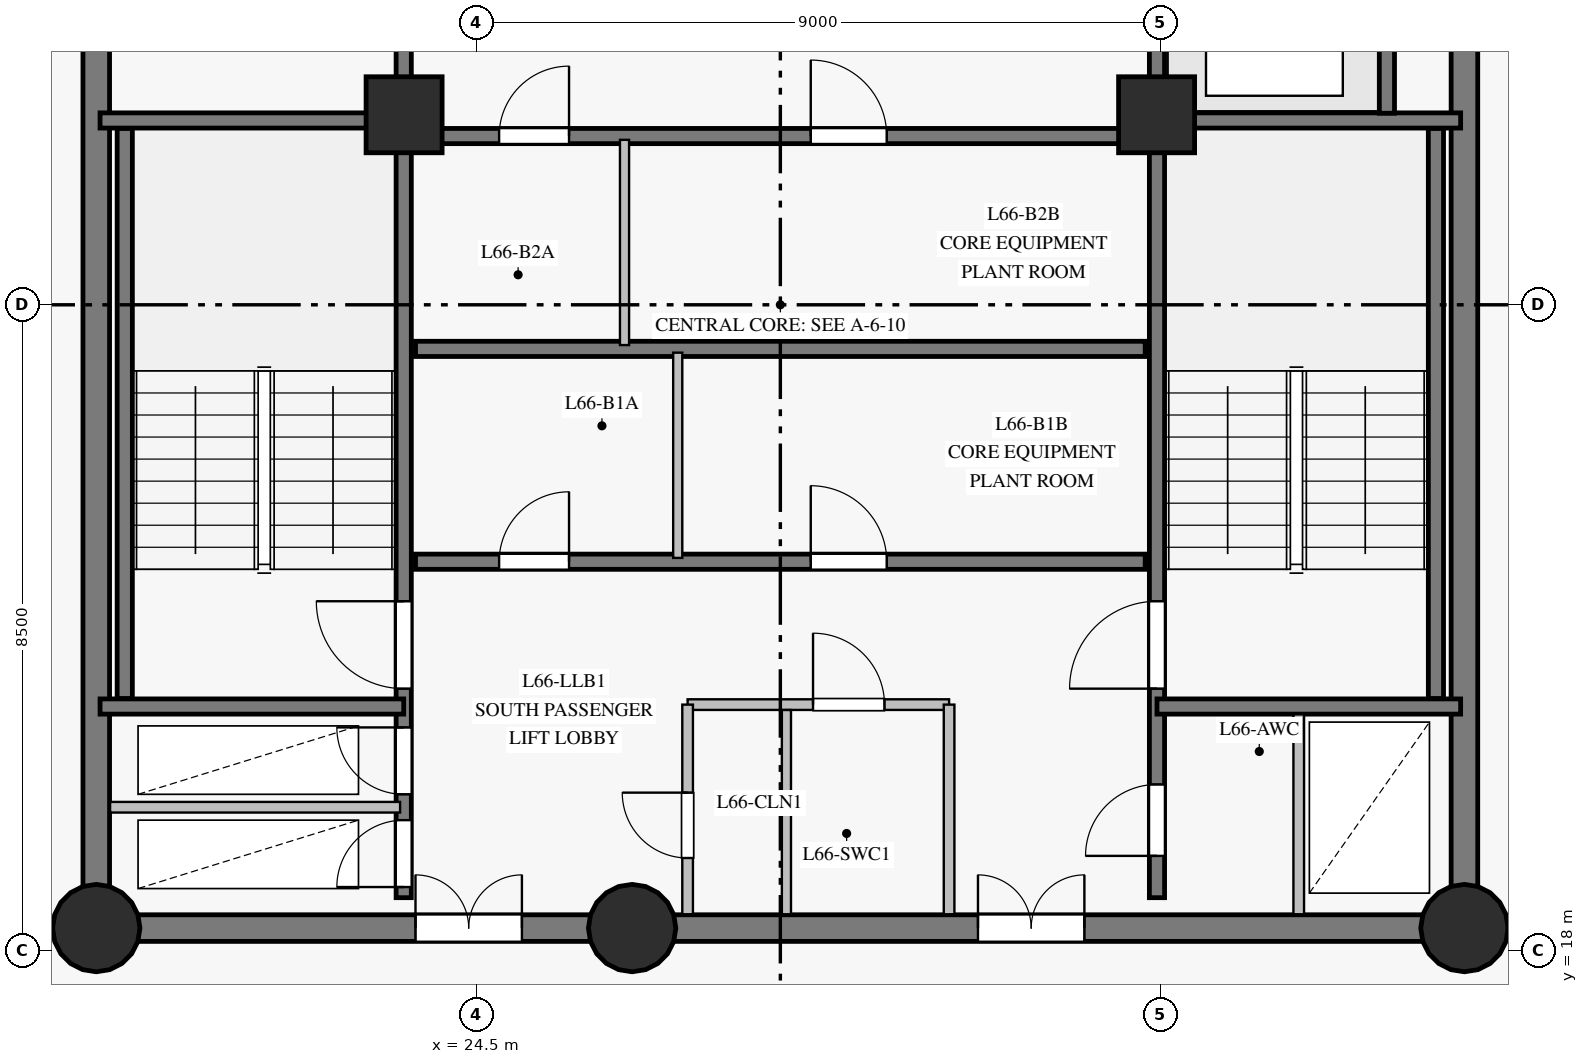
"""IFC4 building model, lengths in metres.
Left out: names, types, materials, properties, quantities, classifications, styles, units other than length and angle.
Written with IfcOpenShell. Run it as: python <this file> out.ifc"""

import sys

from ifc_helpers import new_model, si_unit, direction, frame, frame_2d, origin, origin_with_axes, origin_2d, place, context, subcontext, project, spatial, rectangle, circle, extrude, source, transform, mapped, element, fill, save


model = new_model("IFC4")
c1 = context("Model", 3, precision=1e-05, world=origin(), true_north=direction((0.0, 1.0)))
c2 = subcontext(c1, "Body", "Model", "MODEL_VIEW")
j1 = project(units=[si_unit("LENGTHUNIT", "METRE"), si_unit("PLANEANGLEUNIT", "RADIAN")], contexts=[c1])
p1 = place(None, origin())
s1 = spatial("IfcSite", under=j1, at=p1, CompositionType="ELEMENT")
p2 = place(p1, origin())
s2 = spatial("IfcBuilding", under=s1, at=p2, CompositionType="ELEMENT")
p3 = place(p2, frame((0.0, 0.0, 226.05)))
s3 = spatial("IfcBuildingStorey", under=s2, at=p3, CompositionType="ELEMENT", Elevation=226.05)
p4 = place(p3, frame((19.5, 18.3, 0.0), z_axis=(0.0, 0.0, 1.0), x_axis=(1.0, 0.0, 0.0)))
e1 = element("IfcWall", 1, at=p4, inside=s3, PredefinedType="SHEAR", context=c2, shape_type="SweptSolid", body=[
    extrude(rectangle(XDim=7.05, YDim=0.35, at=frame_2d((3.525, 0.0))), origin(), (0.0, 0.0, 1.0), 2.85),
])
p5 = place(p4, frame((4.2, 0.0, 0.0)))
e2 = element("IfcOpeningElement", 2, at=p5, cuts=e1, PredefinedType="OPENING", context=c2, shape_type="SweptSolid", body=[
    extrude(rectangle(XDim=1.4, YDim=2.2, at=frame_2d((0.7, 1.1))), frame((0.0, 0.185, 0.0), z_axis=(0.0, -1.0, 0.0), x_axis=(1.0, 0.0, 0.0)), (0.0, 0.0, 1.0), 0.37),
])
p6 = place(p3, frame((26.55, 18.3, 0.0), z_axis=(0.0, 0.0, 1.0), x_axis=(1.0, 0.0, 0.0)))
e3 = element("IfcWall", 3, at=p6, inside=s3, PredefinedType="SHEAR", context=c2, shape_type="SweptSolid", body=[
    extrude(rectangle(XDim=10.95, YDim=0.35, at=frame_2d((5.475, 0.0))), origin(), (0.0, 0.0, 1.0), 2.85),
])
p7 = place(p6, frame((4.55, 0.0, 0.0)))
e4 = element("IfcOpeningElement", 4, at=p7, cuts=e3, PredefinedType="OPENING", context=c2, shape_type="SweptSolid", body=[
    extrude(rectangle(XDim=1.4, YDim=2.2, at=frame_2d((0.7, 1.1))), frame((0.0, 0.185, 0.0), z_axis=(0.0, -1.0, 0.0), x_axis=(1.0, 0.0, 0.0)), (0.0, 0.0, 1.0), 0.37),
])
p8 = place(p3, frame((37.5, 18.3, 0.0), z_axis=(0.0, 0.0, 1.0), x_axis=(0.0, 1.0, 0.0)))
e5 = element("IfcWall", 5, at=p8, inside=s3, PredefinedType="SHEAR", context=c2, shape_type="SweptSolid", body=[
    extrude(rectangle(XDim=16.4, YDim=0.35, at=frame_2d((8.2, 0.0))), origin(), (0.0, 0.0, 1.0), 2.85),
])
p9 = place(p8, frame((13.85, 0.0, 0.0)))
e6 = element("IfcOpeningElement", 6, at=p9, cuts=e5, PredefinedType="OPENING", context=c2, shape_type="SweptSolid", body=[
    extrude(rectangle(XDim=1.2, YDim=2.15, at=frame_2d((0.6, 1.075))), frame((0.0, 0.185, 0.0), z_axis=(0.0, -1.0, 0.0), x_axis=(1.0, 0.0, 0.0)), (0.0, 0.0, 1.0), 0.37),
])
p10 = place(p3, frame((19.5, 34.7, 0.0), z_axis=(0.0, 0.0, 1.0), x_axis=(0.0, -1.0, 0.0)))
e7 = element("IfcWall", 7, at=p10, inside=s3, PredefinedType="SHEAR", context=c2, shape_type="SweptSolid", body=[
    extrude(rectangle(XDim=16.4, YDim=0.35, at=frame_2d((8.2, 0.0))), origin(), (0.0, 0.0, 1.0), 2.85),
])
p11 = place(p10, frame((3.24, 0.0, 0.0)))
e8 = element("IfcOpeningElement", 8, at=p11, cuts=e7, PredefinedType="OPENING", context=c2, shape_type="SweptSolid", body=[
    extrude(rectangle(XDim=1.1, YDim=2.15, at=frame_2d((0.55, 1.075))), frame((0.0, 0.185, 0.0), z_axis=(0.0, -1.0, 0.0), x_axis=(1.0, 0.0, 0.0)), (0.0, 0.0, 1.0), 0.37),
])
m1 = source(origin_with_axes(), c2, "Body", "SweptSolid", [
    extrude(circle(Radius=0.575, at=origin_2d()), origin(), (0.0, 0.0, 1.0), 3.05),
])
for number, where, z_axis, x_axis in (
    (9, (19.5, 18.3, 0.0), (0.0, 0.0, 1.0), (1.0, 0.0, 0.0)),
    (10, (26.55, 18.3, 0.0), (0.0, 0.0, 1.0), (1.0, 0.0, 0.0)),
    (11, (37.5, 18.3, 0.0), (0.0, 0.0, 1.0), (1.0, 0.0, 0.0)),
):
    element("IfcColumn", number, at=place(p3, frame(where, z_axis=z_axis, x_axis=x_axis)), inside=s3, PredefinedType="COLUMN", context=c2, shape_type="MappedRepresentation", body=[
        mapped(m1, transform((0.0, 0.0, 0.0), scale=1.0)),
    ])
m2 = source(origin_with_axes(), c2, "Body", "SweptSolid", [
    extrude(rectangle(XDim=1.0, YDim=1.0, at=origin_2d()), origin(), (0.0, 0.0, 1.0), 3.05),
])
for number, where, z_axis, x_axis in (
    (12, (23.55, 29.0, 0.0), (0.0, 0.0, 1.0), (1.0, 0.0, 0.0)),
    (13, (33.45, 29.0, 0.0), (0.0, 0.0, 1.0), (1.0, 0.0, 0.0)),
):
    element("IfcColumn", number, at=place(p3, frame(where, z_axis=z_axis, x_axis=x_axis)), inside=s3, PredefinedType="COLUMN", context=c2, shape_type="MappedRepresentation", body=[
        mapped(m2, transform((0.0, 0.0, 0.0), scale=1.0)),
    ])
p12 = place(p3, frame((23.545, 18.7, 0.0), z_axis=(0.0, 0.0, 1.0), x_axis=(0.0, 1.0, 0.0)))
e14 = element("IfcWall", 14, at=p12, inside=s3, PredefinedType="SHEAR", context=c2, shape_type="SweptSolid", body=[
    extrude(rectangle(XDim=15.6, YDim=0.2, at=frame_2d((7.8, 0.0))), origin(), (0.0, 0.0, 1.0), 2.85),
])
p13 = place(p12, frame((2.75, 0.0, 0.0)))
e15 = element("IfcOpeningElement", 15, at=p13, cuts=e14, PredefinedType="OPENING", context=c2, shape_type="SweptSolid", body=[
    extrude(rectangle(XDim=1.15, YDim=2.15, at=frame_2d((0.575, 1.075))), frame((0.0, 0.11, 0.0), z_axis=(0.0, -1.0, 0.0), x_axis=(1.0, 0.0, 0.0)), (0.0, 0.0, 1.0), 0.22),
])
p14 = place(p12, frame((0.14, 0.0, 0.0)))
e16 = element("IfcOpeningElement", 16, at=p14, cuts=e14, PredefinedType="OPENING", context=c2, shape_type="SweptSolid", body=[
    extrude(rectangle(XDim=0.88, YDim=2.1, at=frame_2d((0.44, 1.05))), frame((0.0, 0.11, 0.0), z_axis=(0.0, -1.0, 0.0), x_axis=(1.0, 0.0, 0.0)), (0.0, 0.0, 1.0), 0.22),
])
p15 = place(p12, frame((1.36, 0.0, 0.0)))
e17 = element("IfcOpeningElement", 17, at=p15, cuts=e14, PredefinedType="OPENING", context=c2, shape_type="SweptSolid", body=[
    extrude(rectangle(XDim=0.88, YDim=2.1, at=frame_2d((0.44, 1.05))), frame((0.0, 0.11, 0.0), z_axis=(0.0, -1.0, 0.0), x_axis=(1.0, 0.0, 0.0)), (0.0, 0.0, 1.0), 0.22),
])
p16 = place(p12, frame((12.1, 0.0, 0.0)))
e18 = element("IfcOpeningElement", 18, at=p16, cuts=e14, PredefinedType="OPENING", context=c2, shape_type="SweptSolid", body=[
    extrude(rectangle(XDim=1.12, YDim=2.15, at=frame_2d((0.56, 1.075))), frame((0.0, 0.11, 0.0), z_axis=(0.0, -1.0, 0.0), x_axis=(1.0, 0.0, 0.0)), (0.0, 0.0, 1.0), 0.22),
])
p17 = place(p12, frame((14.05, 0.0, 0.0)))
e19 = element("IfcOpeningElement", 19, at=p17, cuts=e14, PredefinedType="OPENING", context=c2, shape_type="SweptSolid", body=[
    extrude(rectangle(XDim=1.12, YDim=2.15, at=frame_2d((0.56, 1.075))), frame((0.0, 0.11, 0.0), z_axis=(0.0, -1.0, 0.0), x_axis=(1.0, 0.0, 0.0)), (0.0, 0.0, 1.0), 0.22),
])
p18 = place(p3, frame((33.455, 18.7, 0.0), z_axis=(0.0, 0.0, 1.0), x_axis=(0.0, 1.0, 0.0)))
e20 = element("IfcWall", 20, at=p18, inside=s3, PredefinedType="SHEAR", context=c2, shape_type="SweptSolid", body=[
    extrude(rectangle(XDim=15.6, YDim=0.2, at=frame_2d((7.8, 0.0))), origin(), (0.0, 0.0, 1.0), 2.85),
])
p19 = place(p18, frame((2.75, 0.0, 0.0)))
e21 = element("IfcOpeningElement", 21, at=p19, cuts=e20, PredefinedType="OPENING", context=c2, shape_type="SweptSolid", body=[
    extrude(rectangle(XDim=1.15, YDim=2.15, at=frame_2d((0.575, 1.075))), frame((0.0, 0.11, 0.0), z_axis=(0.0, -1.0, 0.0), x_axis=(1.0, 0.0, 0.0)), (0.0, 0.0, 1.0), 0.22),
])
p20 = place(p18, frame((0.55, 0.0, 0.0)))
e22 = element("IfcOpeningElement", 22, at=p20, cuts=e20, PredefinedType="OPENING", context=c2, shape_type="SweptSolid", body=[
    extrude(rectangle(XDim=0.94, YDim=2.1, at=frame_2d((0.47, 1.05))), frame((0.0, 0.11, 0.0), z_axis=(0.0, -1.0, 0.0), x_axis=(1.0, 0.0, 0.0)), (0.0, 0.0, 1.0), 0.22),
])
p21 = place(p3, frame((23.7, 23.12, 0.0), z_axis=(0.0, 0.0, 1.0), x_axis=(1.0, 0.0, 0.0)))
e23 = element("IfcWall", 23, at=p21, inside=s3, PredefinedType="SHEAR", context=c2, shape_type="SweptSolid", body=[
    extrude(rectangle(XDim=9.6, YDim=0.2, at=frame_2d((4.8, 0.0))), origin(), (0.0, 0.0, 1.0), 2.85),
])
p22 = place(p21, frame((1.1, 0.0, 0.0)))
e24 = element("IfcOpeningElement", 24, at=p22, cuts=e23, PredefinedType="OPENING", context=c2, shape_type="SweptSolid", body=[
    extrude(rectangle(XDim=0.92, YDim=2.1, at=frame_2d((0.46, 1.05))), frame((0.0, 0.11, 0.0), z_axis=(0.0, -1.0, 0.0), x_axis=(1.0, 0.0, 0.0)), (0.0, 0.0, 1.0), 0.22),
])
p23 = place(p21, frame((5.2, 0.0, 0.0)))
e25 = element("IfcOpeningElement", 25, at=p23, cuts=e23, PredefinedType="OPENING", context=c2, shape_type="SweptSolid", body=[
    extrude(rectangle(XDim=1.0, YDim=2.15, at=frame_2d((0.5, 1.075))), frame((0.0, 0.11, 0.0), z_axis=(0.0, -1.0, 0.0), x_axis=(1.0, 0.0, 0.0)), (0.0, 0.0, 1.0), 0.22),
])
p24 = place(p3, frame((23.7, 25.92, 0.0), z_axis=(0.0, 0.0, 1.0), x_axis=(1.0, 0.0, 0.0)))
e26 = element("IfcWall", 26, at=p24, inside=s3, PredefinedType="SHEAR", context=c2, shape_type="SweptSolid", body=[
    extrude(rectangle(XDim=9.6, YDim=0.2, at=frame_2d((4.8, 0.0))), origin(), (0.0, 0.0, 1.0), 2.85),
])
p25 = place(p3, frame((23.7, 28.72, 0.0), z_axis=(0.0, 0.0, 1.0), x_axis=(1.0, 0.0, 0.0)))
e27 = element("IfcWall", 27, at=p25, inside=s3, PredefinedType="SHEAR", context=c2, shape_type="SweptSolid", body=[
    extrude(rectangle(XDim=9.6, YDim=0.2, at=frame_2d((4.8, 0.0))), origin(), (0.0, 0.0, 1.0), 2.85),
])
p26 = place(p25, frame((1.1, 0.0, 0.0)))
e28 = element("IfcOpeningElement", 28, at=p26, cuts=e27, PredefinedType="OPENING", context=c2, shape_type="SweptSolid", body=[
    extrude(rectangle(XDim=0.92, YDim=2.1, at=frame_2d((0.46, 1.05))), frame((0.0, 0.11, 0.0), z_axis=(0.0, -1.0, 0.0), x_axis=(1.0, 0.0, 0.0)), (0.0, 0.0, 1.0), 0.22),
])
p27 = place(p25, frame((5.2, 0.0, 0.0)))
e29 = element("IfcOpeningElement", 29, at=p27, cuts=e27, PredefinedType="OPENING", context=c2, shape_type="SweptSolid", body=[
    extrude(rectangle(XDim=1.0, YDim=2.15, at=frame_2d((0.5, 1.075))), frame((0.0, 0.11, 0.0), z_axis=(0.0, -1.0, 0.0), x_axis=(1.0, 0.0, 0.0)), (0.0, 0.0, 1.0), 0.22),
])
for number, where, z_axis, x_axis in (
    (30, (19.875, 21.32, 0.0), (0.0, 0.0, 1.0), (0.0, 1.0, 0.0)),
    (31, (37.125, 21.32, 0.0), (0.0, 0.0, 1.0), (0.0, 1.0, 0.0)),
):
    element("IfcWall", number, at=place(p3, frame(where, z_axis=z_axis, x_axis=x_axis)), inside=s3, PredefinedType="SHEAR", context=c2, shape_type="SweptSolid", body=[
        extrude(rectangle(XDim=7.5, YDim=0.2, at=frame_2d((3.75, 0.0))), origin(), (0.0, 0.0, 1.0), 2.85),
    ])
for number, where, z_axis, x_axis in (
    (32, (33.455, 21.215, 0.0), (0.0, 0.0, 1.0), (1.0, 0.0, 0.0)),
    (33, (33.455, 28.925, 0.0), (0.0, 0.0, 1.0), (1.0, 0.0, 0.0)),
    (34, (19.55, 21.215, 0.0), (0.0, 0.0, 1.0), (1.0, 0.0, 0.0)),
    (35, (19.55, 28.925, 0.0), (0.0, 0.0, 1.0), (1.0, 0.0, 0.0)),
):
    element("IfcWall", number, at=place(p3, frame(where, z_axis=z_axis, x_axis=x_axis)), inside=s3, PredefinedType="SHEAR", context=c2, shape_type="SweptSolid", body=[
        extrude(rectangle(XDim=3.995, YDim=0.2, at=frame_2d((1.998, 0.0))), origin(), (0.0, 0.0, 1.0), 2.85),
    ])
p28 = place(p3, frame((36.48, 29.02, 0.0), z_axis=(0.0, 0.0, 1.0), x_axis=(0.0, 1.0, 0.0)))
e36 = element("IfcWall", 36, at=p28, inside=s3, PredefinedType="SHEAR", context=c2, shape_type="SweptSolid", body=[
    extrude(rectangle(XDim=2.86, YDim=0.2, at=frame_2d((1.43, 0.0))), origin(), (0.0, 0.0, 1.0), 2.85),
])
p29 = place(p3, frame((19.682, 19.89, 0.0), z_axis=(0.0, 0.0, 1.0), x_axis=(1.0, 0.0, 0.0)))
e37 = element("IfcWall", 37, at=p29, inside=s3, PredefinedType="PARTITIONING", context=c2, shape_type="SweptSolid", body=[
    extrude(rectangle(XDim=3.815, YDim=0.14, at=frame_2d((1.908, 0.0))), origin(), (0.0, 0.0, 1.0), 2.85),
])
p30 = place(p3, frame((27.28, 21.24, 0.0), z_axis=(0.0, 0.0, 1.0), x_axis=(1.0, 0.0, 0.0)))
e38 = element("IfcWall", 38, at=p30, inside=s3, PredefinedType="PARTITIONING", context=c2, shape_type="SweptSolid", body=[
    extrude(rectangle(XDim=3.44, YDim=0.14, at=frame_2d((1.72, 0.0))), origin(), (0.0, 0.0, 1.0), 2.85),
])
p31 = place(p30, frame((1.65, 0.0, 0.0)))
e39 = element("IfcOpeningElement", 39, at=p31, cuts=e38, PredefinedType="OPENING", context=c2, shape_type="SweptSolid", body=[
    extrude(rectangle(XDim=0.94, YDim=2.1, at=frame_2d((0.47, 1.05))), frame((0.0, 0.08, 0.0), z_axis=(0.0, -1.0, 0.0), x_axis=(1.0, 0.0, 0.0)), (0.0, 0.0, 1.0), 0.16),
])
p32 = place(p3, frame((27.15, 23.17, 0.0), z_axis=(0.0, 0.0, 1.0), x_axis=(0.0, 1.0, 0.0)))
e40 = element("IfcWall", 40, at=p32, inside=s3, PredefinedType="PARTITIONING", context=c2, shape_type="SweptSolid", body=[
    extrude(rectangle(XDim=2.7, YDim=0.12, at=frame_2d((1.35, 0.0))), origin(), (0.0, 0.0, 1.0), 2.85),
])
p33 = place(p3, frame((26.45, 25.97, 0.0), z_axis=(0.0, 0.0, 1.0), x_axis=(0.0, 1.0, 0.0)))
e41 = element("IfcWall", 41, at=p33, inside=s3, PredefinedType="PARTITIONING", context=c2, shape_type="SweptSolid", body=[
    extrude(rectangle(XDim=2.7, YDim=0.12, at=frame_2d((1.35, 0.0))), origin(), (0.0, 0.0, 1.0), 2.85),
])
p34 = place(p3, frame((27.28, 18.482, 0.0), z_axis=(0.0, 0.0, 1.0), x_axis=(0.0, 1.0, 0.0)))
e42 = element("IfcWall", 42, at=p34, inside=s3, PredefinedType="PARTITIONING", context=c2, shape_type="SweptSolid", body=[
    extrude(rectangle(XDim=2.758, YDim=0.14, at=frame_2d((1.379, 0.0))), origin(), (0.0, 0.0, 1.0), 2.85),
])
p35 = place(p34, frame((0.74, 0.0, 0.0)))
e43 = element("IfcOpeningElement", 43, at=p35, cuts=e42, PredefinedType="OPENING", context=c2, shape_type="SweptSolid", body=[
    extrude(rectangle(XDim=0.86, YDim=2.1, at=frame_2d((0.43, 1.05))), frame((0.0, 0.08, 0.0), z_axis=(0.0, -1.0, 0.0), x_axis=(1.0, 0.0, 0.0)), (0.0, 0.0, 1.0), 0.16),
])
p36 = place(p3, frame((30.72, 18.482, 0.0), z_axis=(0.0, 0.0, 1.0), x_axis=(0.0, 1.0, 0.0)))
e44 = element("IfcWall", 44, at=p36, inside=s3, PredefinedType="PARTITIONING", context=c2, shape_type="SweptSolid", body=[
    extrude(rectangle(XDim=2.758, YDim=0.14, at=frame_2d((1.379, 0.0))), origin(), (0.0, 0.0, 1.0), 2.85),
])
p37 = place(p3, frame((28.58, 18.482, 0.0), z_axis=(0.0, 0.0, 1.0), x_axis=(0.0, 1.0, 0.0)))
e45 = element("IfcWall", 45, at=p37, inside=s3, PredefinedType="PARTITIONING", context=c2, shape_type="SweptSolid", body=[
    extrude(rectangle(XDim=2.687, YDim=0.12, at=frame_2d((1.344, 0.0))), origin(), (0.0, 0.0, 1.0), 2.85),
])
p38 = place(p3, frame((35.32, 18.482, 0.0), z_axis=(0.0, 0.0, 1.0), x_axis=(0.0, 1.0, 0.0)))
e46 = element("IfcWall", 46, at=p38, inside=s3, PredefinedType="PARTITIONING", context=c2, shape_type="SweptSolid", body=[
    extrude(rectangle(XDim=2.629, YDim=0.14, at=frame_2d((1.314, 0.0))), origin(), (0.0, 0.0, 1.0), 2.85),
])
m3 = source(origin_with_axes(), c2, "Body", "SweptSolid", [
    extrude(rectangle(XDim=1.15, YDim=2.15, at=frame_2d((0.575, 1.075))), frame((0.0, 0.025, 0.0), z_axis=(0.0, -1.0, 0.0), x_axis=(1.0, 0.0, 0.0)), (0.0, 0.0, 1.0), 0.05),
])
p39 = place(p13, origin())
e47 = element("IfcDoor", 47, at=p39, inside=s3, OperationType="SINGLE_SWING_RIGHT", PredefinedType="DOOR", context=c2, shape_type="MappedRepresentation", body=[
    mapped(m3, transform((0.0, 0.0, 0.0), scale=1.0)),
])
fill(e15, e47)
p40 = place(p19, origin())
e48 = element("IfcDoor", 48, at=p40, inside=s3, OperationType="SINGLE_SWING_LEFT", PredefinedType="DOOR", context=c2, shape_type="MappedRepresentation", body=[
    mapped(m3, transform((0.0, 0.0, 0.0), scale=1.0)),
])
fill(e21, e48)
m4 = source(origin_with_axes(), c2, "Body", "SweptSolid", [
    extrude(rectangle(XDim=0.88, YDim=2.1, at=frame_2d((0.44, 1.05))), frame((0.0, 0.025, 0.0), z_axis=(0.0, -1.0, 0.0), x_axis=(1.0, 0.0, 0.0)), (0.0, 0.0, 1.0), 0.05),
])
p41 = place(p14, origin())
e49 = element("IfcDoor", 49, at=p41, inside=s3, OperationType="SINGLE_SWING_LEFT", PredefinedType="DOOR", context=c2, shape_type="MappedRepresentation", body=[
    mapped(m4, transform((0.0, 0.0, 0.0), scale=1.0)),
])
fill(e16, e49)
p42 = place(p15, origin())
e50 = element("IfcDoor", 50, at=p42, inside=s3, OperationType="SINGLE_SWING_RIGHT", PredefinedType="DOOR", context=c2, shape_type="MappedRepresentation", body=[
    mapped(m4, transform((0.0, 0.0, 0.0), scale=1.0)),
])
fill(e17, e50)
m5 = source(origin_with_axes(), c2, "Body", "SweptSolid", [
    extrude(rectangle(XDim=1.4, YDim=2.2, at=frame_2d((0.7, 1.1))), frame((0.0, 0.025, 0.0), z_axis=(0.0, -1.0, 0.0), x_axis=(1.0, 0.0, 0.0)), (0.0, 0.0, 1.0), 0.05),
])
p43 = place(p5, origin())
e51 = element("IfcDoor", 51, at=p43, inside=s3, OperationType="DOUBLE_DOOR_SINGLE_SWING", PredefinedType="DOOR", context=c2, shape_type="MappedRepresentation", body=[
    mapped(m5, transform((0.0, 0.0, 0.0), scale=1.0)),
])
fill(e2, e51)
p44 = place(p7, origin())
e52 = element("IfcDoor", 52, at=p44, inside=s3, OperationType="DOUBLE_DOOR_SINGLE_SWING", PredefinedType="DOOR", context=c2, shape_type="MappedRepresentation", body=[
    mapped(m5, transform((0.0, 0.0, 0.0), scale=1.0)),
])
fill(e4, e52)
m6 = source(origin_with_axes(), c2, "Body", "SweptSolid", [
    extrude(rectangle(XDim=0.94, YDim=2.1, at=frame_2d((0.47, 1.05))), frame((0.0, 0.025, 0.0), z_axis=(0.0, -1.0, 0.0), x_axis=(1.0, 0.0, 0.0)), (0.0, 0.0, 1.0), 0.05),
])
p45 = place(p20, origin())
e53 = element("IfcDoor", 53, at=p45, inside=s3, OperationType="SINGLE_SWING_LEFT", PredefinedType="DOOR", context=c2, shape_type="MappedRepresentation", body=[
    mapped(m6, transform((0.0, 0.0, 0.0), scale=1.0)),
])
fill(e22, e53)
m7 = source(origin_with_axes(), c2, "Body", "SweptSolid", [
    extrude(rectangle(XDim=0.86, YDim=2.1, at=frame_2d((0.43, 1.05))), frame((0.0, 0.025, 0.0), z_axis=(0.0, -1.0, 0.0), x_axis=(1.0, 0.0, 0.0)), (0.0, 0.0, 1.0), 0.05),
])
p46 = place(p35, origin())
e54 = element("IfcDoor", 54, at=p46, inside=s3, OperationType="SINGLE_SWING_RIGHT", PredefinedType="DOOR", context=c2, shape_type="MappedRepresentation", body=[
    mapped(m7, transform((0.0, 0.0, 0.0), scale=1.0)),
])
fill(e43, e54)
p47 = place(p31, origin())
e55 = element("IfcDoor", 55, at=p47, inside=s3, OperationType="SINGLE_SWING_LEFT", PredefinedType="DOOR", context=c2, shape_type="MappedRepresentation", body=[
    mapped(m6, transform((0.0, 0.0, 0.0), scale=1.0)),
])
fill(e39, e55)
m8 = source(origin_with_axes(), c2, "Body", "SweptSolid", [
    extrude(rectangle(XDim=0.92, YDim=2.1, at=frame_2d((0.46, 1.05))), frame((0.0, 0.025, 0.0), z_axis=(0.0, -1.0, 0.0), x_axis=(1.0, 0.0, 0.0)), (0.0, 0.0, 1.0), 0.05),
])
p48 = place(p22, origin())
e56 = element("IfcDoor", 56, at=p48, inside=s3, OperationType="SINGLE_SWING_RIGHT", PredefinedType="DOOR", context=c2, shape_type="MappedRepresentation", body=[
    mapped(m8, transform((0.0, 0.0, 0.0), scale=1.0)),
])
fill(e24, e56)
m9 = source(origin_with_axes(), c2, "Body", "SweptSolid", [
    extrude(rectangle(XDim=1.0, YDim=2.15, at=frame_2d((0.5, 1.075))), frame((0.0, 0.025, 0.0), z_axis=(0.0, -1.0, 0.0), x_axis=(1.0, 0.0, 0.0)), (0.0, 0.0, 1.0), 0.05),
])
p49 = place(p23, origin())
e57 = element("IfcDoor", 57, at=p49, inside=s3, OperationType="SINGLE_SWING_LEFT", PredefinedType="DOOR", context=c2, shape_type="MappedRepresentation", body=[
    mapped(m9, transform((0.0, 0.0, 0.0), scale=1.0)),
])
fill(e25, e57)
p50 = place(p26, origin())
e58 = element("IfcDoor", 58, at=p50, inside=s3, OperationType="SINGLE_SWING_RIGHT", PredefinedType="DOOR", context=c2, shape_type="MappedRepresentation", body=[
    mapped(m8, transform((0.0, 0.0, 0.0), scale=1.0)),
])
fill(e28, e58)
p51 = place(p27, origin())
e59 = element("IfcDoor", 59, at=p51, inside=s3, OperationType="SINGLE_SWING_LEFT", PredefinedType="DOOR", context=c2, shape_type="MappedRepresentation", body=[
    mapped(m9, transform((0.0, 0.0, 0.0), scale=1.0)),
])
fill(e29, e59)
save(model, sys.argv[1])
